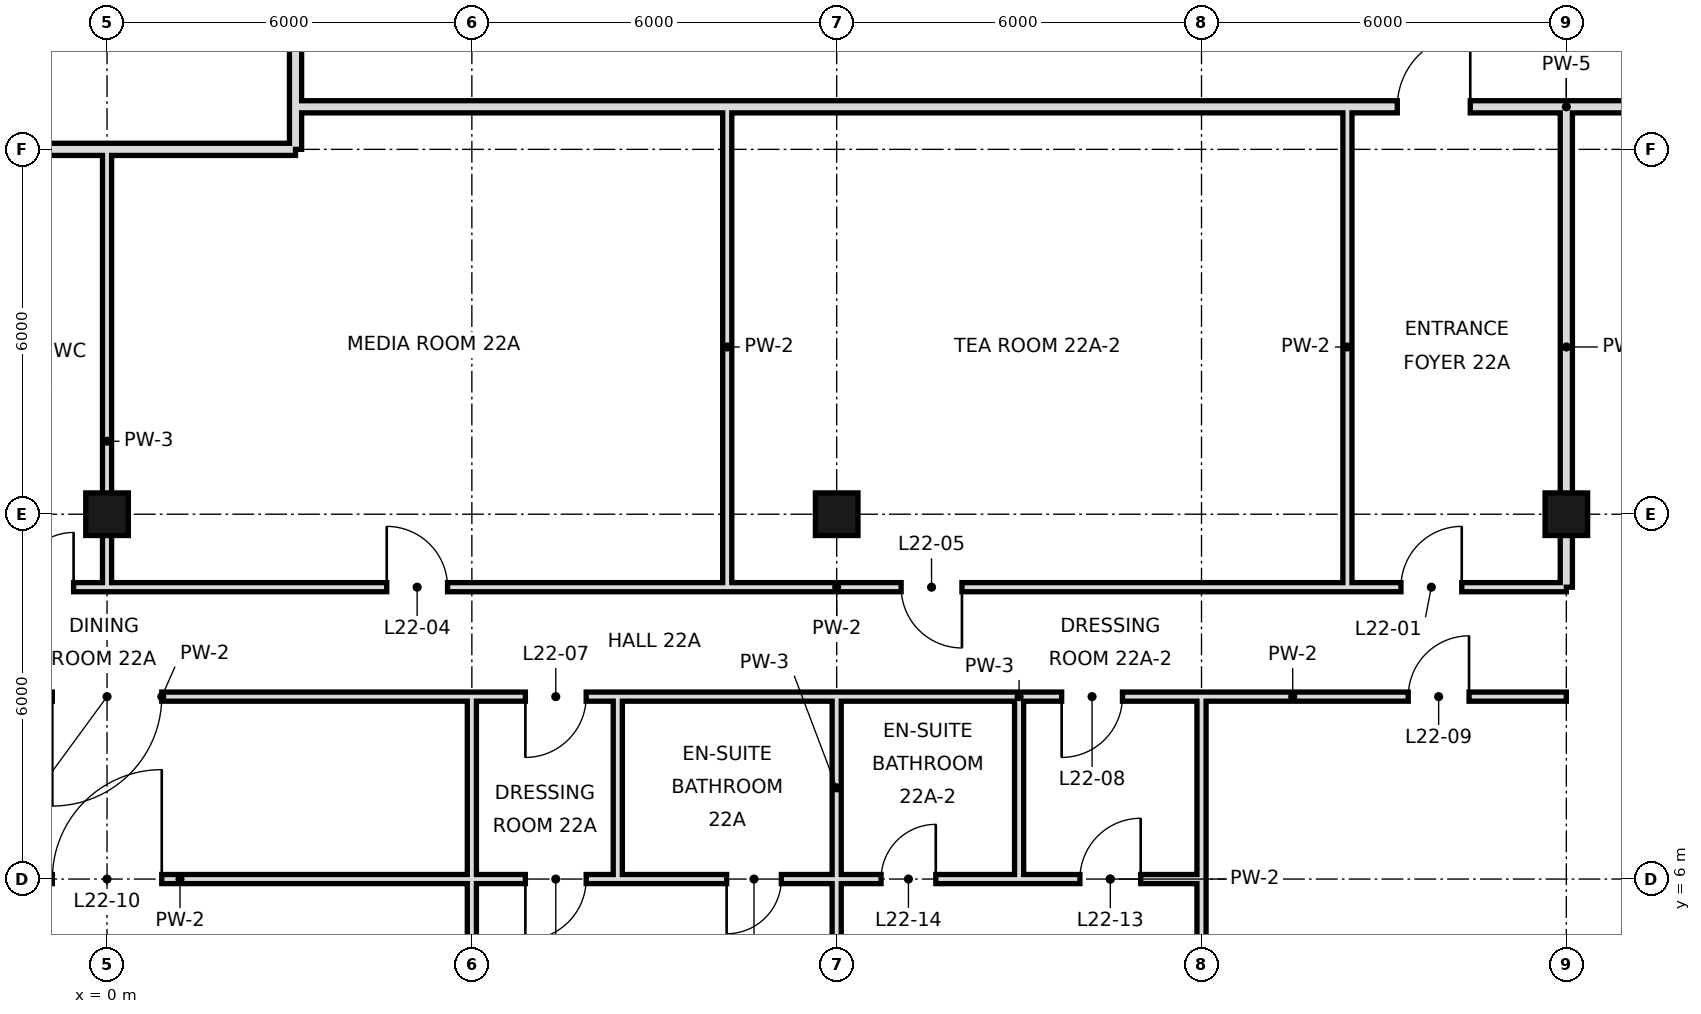
"""IFC4 building model, lengths in metres.
Left out: names, types, materials, properties, quantities, classifications, styles, units other than length and angle.
Written with IfcOpenShell. Run it as: python <this file> out.ifc"""

import sys

from ifc_helpers import new_model, si_unit, direction, frame, frame_2d, origin, origin_2d, place, context, subcontext, project, spatial, rectangle, hollow_rectangle, extrude, element, fill, save


model = new_model("IFC4")
c1 = context("Model", 3, precision=1e-05, world=origin(), true_north=direction((0.0, 1.0)))
c2 = subcontext(c1, "Body", "Model", "MODEL_VIEW")
j1 = project(units=[si_unit("LENGTHUNIT", "METRE"), si_unit("PLANEANGLEUNIT", "RADIAN")], contexts=[c1])
p1 = place(None, origin())
s1 = spatial("IfcSite", under=j1, at=p1, CompositionType="ELEMENT")
p2 = place(p1, origin())
s2 = spatial("IfcBuilding", under=s1, at=p2, CompositionType="ELEMENT")
p3 = place(p2, frame((0.0, 0.0, 103.4)))
s3 = spatial("IfcBuildingStorey", under=s2, at=p3, CompositionType="ELEMENT", Elevation=103.4)
for number, where, z_axis, x_axis in (
    (1, (0.0, 12.0, 0.0), (0.0, 0.0, 1.0), (1.0, 0.0, 0.0)),
    (2, (12.0, 12.0, 0.0), (0.0, 0.0, 1.0), (1.0, 0.0, 0.0)),
    (3, (24.0, 12.0, 0.0), (0.0, 0.0, 1.0), (1.0, 0.0, 0.0)),
):
    element("IfcColumn", number, at=place(p3, frame(where, z_axis=z_axis, x_axis=x_axis)), inside=s3, PredefinedType="COLUMN", context=c2, shape_type="SweptSolid", body=[
        extrude(hollow_rectangle(XDim=0.7, YDim=0.7, WallThickness=0.036, at=origin_2d()), origin(), (0.0, 0.0, 1.0), 3.6),
    ])
p4 = place(p3, frame((0.0, 10.8, 0.0), z_axis=(0.0, 0.0, 1.0), x_axis=(0.0, 1.0, 0.0)))
e4 = element("IfcWall", 4, at=p4, inside=s3, PredefinedType="PARTITIONING", context=c2, shape_type="SweptSolid", body=[
    extrude(rectangle(XDim=7.2, YDim=0.15, at=frame_2d((3.6, 0.0))), origin(), (0.0, 0.0, 1.0), 2.72),
])
p5 = place(p3, frame((10.2, 10.8, 0.0), z_axis=(0.0, 0.0, 1.0), x_axis=(0.0, 1.0, 0.0)))
e5 = element("IfcWall", 5, at=p5, inside=s3, PredefinedType="PARTITIONING", context=c2, shape_type="SweptSolid", body=[
    extrude(rectangle(XDim=7.9, YDim=0.15, at=frame_2d((3.95, 0.0))), origin(), (0.0, 0.0, 1.0), 3.42),
])
p6 = place(p3, frame((12.0, 0.0, 0.0), z_axis=(0.0, 0.0, 1.0), x_axis=(0.0, 1.0, 0.0)))
e6 = element("IfcWall", 6, at=p6, inside=s3, PredefinedType="PARTITIONING", context=c2, shape_type="SweptSolid", body=[
    extrude(rectangle(XDim=6.0, YDim=0.15, at=frame_2d((3.0, 0.0))), origin(), (0.0, 0.0, 1.0), 2.72),
])
p7 = place(p3, frame((12.0, 6.0, 0.0), z_axis=(0.0, 0.0, 1.0), x_axis=(0.0, 1.0, 0.0)))
e7 = element("IfcWall", 7, at=p7, inside=s3, PredefinedType="PARTITIONING", context=c2, shape_type="SweptSolid", body=[
    extrude(rectangle(XDim=3.0, YDim=0.15, at=frame_2d((1.5, 0.0))), origin(), (0.0, 0.0, 1.0), 2.72),
])
p8 = place(p3, frame((15.0, 6.0, 0.0), z_axis=(0.0, 0.0, 1.0), x_axis=(0.0, 1.0, 0.0)))
e8 = element("IfcWall", 8, at=p8, inside=s3, PredefinedType="PARTITIONING", context=c2, shape_type="SweptSolid", body=[
    extrude(rectangle(XDim=3.0, YDim=0.15, at=frame_2d((1.5, 0.0))), origin(), (0.0, 0.0, 1.0), 3.42),
])
p9 = place(p3, frame((18.0, -0.6, 0.0), z_axis=(0.0, 0.0, 1.0), x_axis=(0.0, 1.0, 0.0)))
e9 = element("IfcWall", 9, at=p9, inside=s3, PredefinedType="PARTITIONING", context=c2, shape_type="SweptSolid", body=[
    extrude(rectangle(XDim=9.6, YDim=0.15, at=frame_2d((4.8, 0.0))), origin(), (0.0, 0.0, 1.0), 2.72),
])
p10 = place(p3, frame((20.4, 10.8, 0.0), z_axis=(0.0, 0.0, 1.0), x_axis=(0.0, 1.0, 0.0)))
e10 = element("IfcWall", 10, at=p10, inside=s3, PredefinedType="PARTITIONING", context=c2, shape_type="SweptSolid", body=[
    extrude(rectangle(XDim=7.9, YDim=0.15, at=frame_2d((3.95, 0.0))), origin(), (0.0, 0.0, 1.0), 3.42),
])
p11 = place(p3, frame((24.0, 10.8, 0.0), z_axis=(0.0, 0.0, 1.0), x_axis=(0.0, 1.0, 0.0)))
e11 = element("IfcWall", 11, at=p11, inside=s3, PredefinedType="SOLIDWALL", context=c2, shape_type="SweptSolid", body=[
    extrude(rectangle(XDim=7.9, YDim=0.2, at=frame_2d((3.95, 0.0))), origin(), (0.0, 0.0, 1.0), 2.72),
])
p12 = place(p3, frame((3.1, 18.0, 0.0), z_axis=(0.0, 0.0, 1.0), x_axis=(0.0, 1.0, 0.0)))
e12 = element("IfcWall", 12, at=p12, inside=s3, PredefinedType="SOLIDWALL", context=c2, shape_type="SweptSolid", body=[
    extrude(rectangle(XDim=30.6, YDim=0.2, at=frame_2d((15.3, 0.0))), origin(), (0.0, 0.0, 1.0), 2.72),
])
p13 = place(p12, frame((9.23, 0.0, 0.0)))
e13 = element("IfcOpeningElement", 13, at=p13, cuts=e12, PredefinedType="OPENING", context=c2, shape_type="SweptSolid", body=[
    extrude(rectangle(XDim=1.2, YDim=2.4, at=frame_2d((0.6, 1.2))), frame((0.0, 0.11, 0.0), z_axis=(0.0, -1.0, 0.0), x_axis=(1.0, 0.0, 0.0)), (0.0, 0.0, 1.0), 0.22),
])
p14 = place(p3, frame((6.0, -0.6, 0.0), z_axis=(0.0, 0.0, 1.0), x_axis=(0.0, 1.0, 0.0)))
e14 = element("IfcWall", 14, at=p14, inside=s3, PredefinedType="PARTITIONING", context=c2, shape_type="SweptSolid", body=[
    extrude(rectangle(XDim=9.6, YDim=0.15, at=frame_2d((4.8, 0.0))), origin(), (0.0, 0.0, 1.0), 2.72),
])
p15 = place(p3, frame((8.4, 6.0, 0.0), z_axis=(0.0, 0.0, 1.0), x_axis=(0.0, 1.0, 0.0)))
e15 = element("IfcWall", 15, at=p15, inside=s3, PredefinedType="PARTITIONING", context=c2, shape_type="SweptSolid", body=[
    extrude(rectangle(XDim=3.0, YDim=0.15, at=frame_2d((1.5, 0.0))), origin(), (0.0, 0.0, 1.0), 3.42),
])
p16 = place(p3, frame((0.0, 10.8, 0.0), z_axis=(0.0, 0.0, 1.0), x_axis=(1.0, 0.0, 0.0)))
e16 = element("IfcWall", 16, at=p16, inside=s3, PredefinedType="PARTITIONING", context=c2, shape_type="SweptSolid", body=[
    extrude(rectangle(XDim=24.0, YDim=0.15, at=frame_2d((12.0, 0.0))), origin(), (0.0, 0.0, 1.0), 3.42),
])
p17 = place(p16, frame((21.28, 0.0, 0.0)))
e17 = element("IfcOpeningElement", 17, at=p17, cuts=e16, PredefinedType="OPENING", context=c2, shape_type="SweptSolid", body=[
    extrude(rectangle(XDim=1.0, YDim=2.4, at=frame_2d((0.5, 1.2))), frame((0.0, 0.085, 0.0), z_axis=(0.0, -1.0, 0.0), x_axis=(1.0, 0.0, 0.0)), (0.0, 0.0, 1.0), 0.17),
])
p18 = place(p16, frame((4.6, 0.0, 0.0)))
e18 = element("IfcOpeningElement", 18, at=p18, cuts=e16, PredefinedType="OPENING", context=c2, shape_type="SweptSolid", body=[
    extrude(rectangle(XDim=1.0, YDim=2.4, at=frame_2d((0.5, 1.2))), frame((0.0, 0.085, 0.0), z_axis=(0.0, -1.0, 0.0), x_axis=(1.0, 0.0, 0.0)), (0.0, 0.0, 1.0), 0.17),
])
p19 = place(p16, frame((13.06, 0.0, 0.0)))
e19 = element("IfcOpeningElement", 19, at=p19, cuts=e16, PredefinedType="OPENING", context=c2, shape_type="SweptSolid", body=[
    extrude(rectangle(XDim=1.0, YDim=2.4, at=frame_2d((0.5, 1.2))), frame((0.0, 0.085, 0.0), z_axis=(0.0, -1.0, 0.0), x_axis=(1.0, 0.0, 0.0)), (0.0, 0.0, 1.0), 0.17),
])
p20 = place(p3, frame((-2.4, 10.8, 0.0), z_axis=(0.0, 0.0, 1.0), x_axis=(1.0, 0.0, 0.0)))
e20 = element("IfcWall", 20, at=p20, inside=s3, PredefinedType="PARTITIONING", context=c2, shape_type="SweptSolid", body=[
    extrude(rectangle(XDim=2.4, YDim=0.15, at=frame_2d((1.2, 0.0))), origin(), (0.0, 0.0, 1.0), 3.42),
])
p21 = place(p20, frame((0.95, 0.0, 0.0)))
e21 = element("IfcOpeningElement", 21, at=p21, cuts=e20, PredefinedType="OPENING", context=c2, shape_type="SweptSolid", body=[
    extrude(rectangle(XDim=0.9, YDim=2.4, at=frame_2d((0.45, 1.2))), frame((0.0, 0.085, 0.0), z_axis=(0.0, -1.0, 0.0), x_axis=(1.0, 0.0, 0.0)), (0.0, 0.0, 1.0), 0.17),
])
p22 = place(p3, frame((-2.4, 18.0, 0.0), z_axis=(0.0, 0.0, 1.0), x_axis=(1.0, 0.0, 0.0)))
e22 = element("IfcWall", 22, at=p22, inside=s3, PredefinedType="SOLIDWALL", context=c2, shape_type="SweptSolid", body=[
    extrude(rectangle(XDim=5.5, YDim=0.2, at=frame_2d((2.75, 0.0))), origin(), (0.0, 0.0, 1.0), 2.72),
])
p23 = place(p3, frame((3.1, 18.7, 0.0), z_axis=(0.0, 0.0, 1.0), x_axis=(1.0, 0.0, 0.0)))
e23 = element("IfcWall", 23, at=p23, inside=s3, PredefinedType="SOLIDWALL", context=c2, shape_type="SweptSolid", body=[
    extrude(rectangle(XDim=41.8, YDim=0.2, at=frame_2d((20.9, 0.0))), origin(), (0.0, 0.0, 1.0), 2.72),
])
p24 = place(p23, frame((18.12, 0.0, 0.0)))
e24 = element("IfcOpeningElement", 24, at=p24, cuts=e23, PredefinedType="OPENING", context=c2, shape_type="SweptSolid", body=[
    extrude(rectangle(XDim=1.2, YDim=2.4, at=frame_2d((0.6, 1.2))), frame((0.0, 0.11, 0.0), z_axis=(0.0, -1.0, 0.0), x_axis=(1.0, 0.0, 0.0)), (0.0, 0.0, 1.0), 0.22),
])
p25 = place(p23, frame((26.73, 0.0, 0.0)))
e25 = element("IfcOpeningElement", 25, at=p25, cuts=e23, PredefinedType="OPENING", context=c2, shape_type="SweptSolid", body=[
    extrude(rectangle(XDim=1.8, YDim=2.4, at=frame_2d((0.9, 1.2))), frame((0.0, 0.11, 0.0), z_axis=(0.0, -1.0, 0.0), x_axis=(1.0, 0.0, 0.0)), (0.0, 0.0, 1.0), 0.22),
])
p26 = place(p3, frame((-6.0, 6.0, 0.0), z_axis=(0.0, 0.0, 1.0), x_axis=(1.0, 0.0, 0.0)))
e26 = element("IfcWall", 26, at=p26, inside=s3, PredefinedType="PARTITIONING", context=c2, shape_type="SweptSolid", body=[
    extrude(rectangle(XDim=14.4, YDim=0.15, at=frame_2d((7.2, 0.0))), origin(), (0.0, 0.0, 1.0), 2.97),
])
p27 = place(p26, frame((5.1, 0.0, 0.0)))
e27 = element("IfcOpeningElement", 27, at=p27, cuts=e26, PredefinedType="OPENING", context=c2, shape_type="SweptSolid", body=[
    extrude(rectangle(XDim=1.8, YDim=2.4, at=frame_2d((0.9, 1.2))), frame((0.0, 0.085, 0.0), z_axis=(0.0, -1.0, 0.0), x_axis=(1.0, 0.0, 0.0)), (0.0, 0.0, 1.0), 0.17),
])
p28 = place(p26, frame((12.88, 0.0, 0.0)))
e28 = element("IfcOpeningElement", 28, at=p28, cuts=e26, PredefinedType="OPENING", context=c2, shape_type="SweptSolid", body=[
    extrude(rectangle(XDim=1.0, YDim=2.4, at=frame_2d((0.5, 1.2))), frame((0.0, 0.085, 0.0), z_axis=(0.0, -1.0, 0.0), x_axis=(1.0, 0.0, 0.0)), (0.0, 0.0, 1.0), 0.17),
])
p29 = place(p3, frame((15.0, 6.0, 0.0), z_axis=(0.0, 0.0, 1.0), x_axis=(1.0, 0.0, 0.0)))
e29 = element("IfcWall", 29, at=p29, inside=s3, PredefinedType="PARTITIONING", context=c2, shape_type="SweptSolid", body=[
    extrude(rectangle(XDim=3.0, YDim=0.15, at=frame_2d((1.5, 0.0))), origin(), (0.0, 0.0, 1.0), 2.97),
])
p30 = place(p29, frame((1.0, 0.0, 0.0)))
e30 = element("IfcOpeningElement", 30, at=p30, cuts=e29, PredefinedType="OPENING", context=c2, shape_type="SweptSolid", body=[
    extrude(rectangle(XDim=1.0, YDim=2.4, at=frame_2d((0.5, 1.2))), frame((0.0, 0.085, 0.0), z_axis=(0.0, -1.0, 0.0), x_axis=(1.0, 0.0, 0.0)), (0.0, 0.0, 1.0), 0.17),
])
p31 = place(p3, frame((8.4, 6.0, 0.0), z_axis=(0.0, 0.0, 1.0), x_axis=(1.0, 0.0, 0.0)))
e31 = element("IfcWall", 31, at=p31, inside=s3, PredefinedType="PARTITIONING", context=c2, shape_type="SweptSolid", body=[
    extrude(rectangle(XDim=6.6, YDim=0.15, at=frame_2d((3.3, 0.0))), origin(), (0.0, 0.0, 1.0), 2.97),
])
p32 = place(p31, frame((1.79, 0.0, 0.0)))
e32 = element("IfcOpeningElement", 32, at=p32, cuts=e31, PredefinedType="OPENING", context=c2, shape_type="SweptSolid", body=[
    extrude(rectangle(XDim=0.9, YDim=2.4, at=frame_2d((0.45, 1.2))), frame((0.0, 0.085, 0.0), z_axis=(0.0, -1.0, 0.0), x_axis=(1.0, 0.0, 0.0)), (0.0, 0.0, 1.0), 0.17),
])
p33 = place(p31, frame((4.33, 0.0, 0.0)))
e33 = element("IfcOpeningElement", 33, at=p33, cuts=e31, PredefinedType="OPENING", context=c2, shape_type="SweptSolid", body=[
    extrude(rectangle(XDim=0.9, YDim=2.4, at=frame_2d((0.45, 1.2))), frame((0.0, 0.085, 0.0), z_axis=(0.0, -1.0, 0.0), x_axis=(1.0, 0.0, 0.0)), (0.0, 0.0, 1.0), 0.17),
])
p34 = place(p3, frame((-6.6, 9.0, 0.0), z_axis=(0.0, 0.0, 1.0), x_axis=(1.0, 0.0, 0.0)))
e34 = element("IfcWall", 34, at=p34, inside=s3, PredefinedType="PARTITIONING", context=c2, shape_type="SweptSolid", body=[
    extrude(rectangle(XDim=15.0, YDim=0.15, at=frame_2d((7.5, 0.0))), origin(), (0.0, 0.0, 1.0), 3.42),
])
p35 = place(p34, frame((5.7, 0.0, 0.0)))
e35 = element("IfcOpeningElement", 35, at=p35, cuts=e34, PredefinedType="OPENING", context=c2, shape_type="SweptSolid", body=[
    extrude(rectangle(XDim=1.8, YDim=2.4, at=frame_2d((0.9, 1.2))), frame((0.0, 0.085, 0.0), z_axis=(0.0, -1.0, 0.0), x_axis=(1.0, 0.0, 0.0)), (0.0, 0.0, 1.0), 0.17),
])
p36 = place(p34, frame((13.48, 0.0, 0.0)))
e36 = element("IfcOpeningElement", 36, at=p36, cuts=e34, PredefinedType="OPENING", context=c2, shape_type="SweptSolid", body=[
    extrude(rectangle(XDim=1.0, YDim=2.4, at=frame_2d((0.5, 1.2))), frame((0.0, 0.085, 0.0), z_axis=(0.0, -1.0, 0.0), x_axis=(1.0, 0.0, 0.0)), (0.0, 0.0, 1.0), 0.17),
])
p37 = place(p3, frame((15.0, 9.0, 0.0), z_axis=(0.0, 0.0, 1.0), x_axis=(1.0, 0.0, 0.0)))
e37 = element("IfcWall", 37, at=p37, inside=s3, PredefinedType="PARTITIONING", context=c2, shape_type="SweptSolid", body=[
    extrude(rectangle(XDim=9.0, YDim=0.15, at=frame_2d((4.5, 0.0))), origin(), (0.0, 0.0, 1.0), 3.42),
])
p38 = place(p37, frame((0.7, 0.0, 0.0)))
e38 = element("IfcOpeningElement", 38, at=p38, cuts=e37, PredefinedType="OPENING", context=c2, shape_type="SweptSolid", body=[
    extrude(rectangle(XDim=1.0, YDim=2.4, at=frame_2d((0.5, 1.2))), frame((0.0, 0.085, 0.0), z_axis=(0.0, -1.0, 0.0), x_axis=(1.0, 0.0, 0.0)), (0.0, 0.0, 1.0), 0.17),
])
p39 = place(p37, frame((6.4, 0.0, 0.0)))
e39 = element("IfcOpeningElement", 39, at=p39, cuts=e37, PredefinedType="OPENING", context=c2, shape_type="SweptSolid", body=[
    extrude(rectangle(XDim=1.0, YDim=2.4, at=frame_2d((0.5, 1.2))), frame((0.0, 0.085, 0.0), z_axis=(0.0, -1.0, 0.0), x_axis=(1.0, 0.0, 0.0)), (0.0, 0.0, 1.0), 0.17),
])
p40 = place(p3, frame((8.4, 9.0, 0.0), z_axis=(0.0, 0.0, 1.0), x_axis=(1.0, 0.0, 0.0)))
e40 = element("IfcWall", 40, at=p40, inside=s3, PredefinedType="PARTITIONING", context=c2, shape_type="SweptSolid", body=[
    extrude(rectangle(XDim=6.6, YDim=0.15, at=frame_2d((3.3, 0.0))), origin(), (0.0, 0.0, 1.0), 3.42),
])
p41 = place(p17, frame((1.0, 0.0, 0.0), z_axis=(0.0, 0.0, 1.0), x_axis=(-1.0, 0.0, 0.0)))
e41 = element("IfcDoor", 41, at=p41, inside=s3, OperationType="SINGLE_SWING_LEFT", PredefinedType="DOOR", context=c2, shape_type="SweptSolid", body=[
    extrude(rectangle(XDim=1.0, YDim=2.4, at=frame_2d((0.5, 1.2))), frame((0.0, 0.025, 0.0), z_axis=(0.0, -1.0, 0.0), x_axis=(1.0, 0.0, 0.0)), (0.0, 0.0, 1.0), 0.05),
])
fill(e17, e41)
p42 = place(p21, frame((0.9, 0.0, 0.0), z_axis=(0.0, 0.0, 1.0), x_axis=(-1.0, 0.0, 0.0)))
e42 = element("IfcDoor", 42, at=p42, inside=s3, OperationType="SINGLE_SWING_LEFT", PredefinedType="DOOR", context=c2, shape_type="SweptSolid", body=[
    extrude(rectangle(XDim=0.9, YDim=2.4, at=frame_2d((0.45, 1.2))), frame((0.0, 0.025, 0.0), z_axis=(0.0, -1.0, 0.0), x_axis=(1.0, 0.0, 0.0)), (0.0, 0.0, 1.0), 0.05),
])
fill(e21, e42)
p43 = place(p18, origin())
e43 = element("IfcDoor", 43, at=p43, inside=s3, OperationType="SINGLE_SWING_LEFT", PredefinedType="DOOR", context=c2, shape_type="SweptSolid", body=[
    extrude(rectangle(XDim=1.0, YDim=2.4, at=frame_2d((0.5, 1.2))), frame((0.0, 0.025, 0.0), z_axis=(0.0, -1.0, 0.0), x_axis=(1.0, 0.0, 0.0)), (0.0, 0.0, 1.0), 0.05),
])
fill(e18, e43)
p44 = place(p19, origin())
e44 = element("IfcDoor", 44, at=p44, inside=s3, OperationType="SINGLE_SWING_RIGHT", PredefinedType="DOOR", context=c2, shape_type="SweptSolid", body=[
    extrude(rectangle(XDim=1.0, YDim=2.4, at=frame_2d((0.5, 1.2))), frame((0.0, 0.025, 0.0), z_axis=(0.0, -1.0, 0.0), x_axis=(1.0, 0.0, 0.0)), (0.0, 0.0, 1.0), 0.05),
])
fill(e19, e44)
p45 = place(p35, frame((1.8, 0.0, 0.0), z_axis=(0.0, 0.0, 1.0), x_axis=(-1.0, 0.0, 0.0)))
e45 = element("IfcDoor", 45, at=p45, inside=s3, OperationType="SINGLE_SWING_RIGHT", PredefinedType="DOOR", context=c2, shape_type="SweptSolid", body=[
    extrude(rectangle(XDim=1.8, YDim=2.4, at=frame_2d((0.9, 1.2))), frame((0.0, 0.025, 0.0), z_axis=(0.0, -1.0, 0.0), x_axis=(1.0, 0.0, 0.0)), (0.0, 0.0, 1.0), 0.05),
])
fill(e35, e45)
p46 = place(p36, frame((1.0, 0.0, 0.0), z_axis=(0.0, 0.0, 1.0), x_axis=(-1.0, 0.0, 0.0)))
e46 = element("IfcDoor", 46, at=p46, inside=s3, OperationType="SINGLE_SWING_RIGHT", PredefinedType="DOOR", context=c2, shape_type="SweptSolid", body=[
    extrude(rectangle(XDim=1.0, YDim=2.4, at=frame_2d((0.5, 1.2))), frame((0.0, 0.025, 0.0), z_axis=(0.0, -1.0, 0.0), x_axis=(1.0, 0.0, 0.0)), (0.0, 0.0, 1.0), 0.05),
])
fill(e36, e46)
p47 = place(p38, frame((1.0, 0.0, 0.0), z_axis=(0.0, 0.0, 1.0), x_axis=(-1.0, 0.0, 0.0)))
e47 = element("IfcDoor", 47, at=p47, inside=s3, OperationType="SINGLE_SWING_RIGHT", PredefinedType="DOOR", context=c2, shape_type="SweptSolid", body=[
    extrude(rectangle(XDim=1.0, YDim=2.4, at=frame_2d((0.5, 1.2))), frame((0.0, 0.025, 0.0), z_axis=(0.0, -1.0, 0.0), x_axis=(1.0, 0.0, 0.0)), (0.0, 0.0, 1.0), 0.05),
])
fill(e38, e47)
p48 = place(p39, frame((1.0, 0.0, 0.0), z_axis=(0.0, 0.0, 1.0), x_axis=(-1.0, 0.0, 0.0)))
e48 = element("IfcDoor", 48, at=p48, inside=s3, OperationType="SINGLE_SWING_LEFT", PredefinedType="DOOR", context=c2, shape_type="SweptSolid", body=[
    extrude(rectangle(XDim=1.0, YDim=2.4, at=frame_2d((0.5, 1.2))), frame((0.0, 0.025, 0.0), z_axis=(0.0, -1.0, 0.0), x_axis=(1.0, 0.0, 0.0)), (0.0, 0.0, 1.0), 0.05),
])
fill(e39, e48)
p49 = place(p27, frame((1.8, 0.0, 0.0), z_axis=(0.0, 0.0, 1.0), x_axis=(-1.0, 0.0, 0.0)))
e49 = element("IfcDoor", 49, at=p49, inside=s3, OperationType="SINGLE_SWING_LEFT", PredefinedType="DOOR", context=c2, shape_type="SweptSolid", body=[
    extrude(rectangle(XDim=1.8, YDim=2.4, at=frame_2d((0.9, 1.2))), frame((0.0, 0.025, 0.0), z_axis=(0.0, -1.0, 0.0), x_axis=(1.0, 0.0, 0.0)), (0.0, 0.0, 1.0), 0.05),
])
fill(e27, e49)
p50 = place(p28, frame((1.0, 0.0, 0.0), z_axis=(0.0, 0.0, 1.0), x_axis=(-1.0, 0.0, 0.0)))
e50 = element("IfcDoor", 50, at=p50, inside=s3, OperationType="SINGLE_SWING_RIGHT", PredefinedType="DOOR", context=c2, shape_type="SweptSolid", body=[
    extrude(rectangle(XDim=1.0, YDim=2.4, at=frame_2d((0.5, 1.2))), frame((0.0, 0.025, 0.0), z_axis=(0.0, -1.0, 0.0), x_axis=(1.0, 0.0, 0.0)), (0.0, 0.0, 1.0), 0.05),
])
fill(e28, e50)
p51 = place(p32, frame((0.9, 0.0, 0.0), z_axis=(0.0, 0.0, 1.0), x_axis=(-1.0, 0.0, 0.0)))
e51 = element("IfcDoor", 51, at=p51, inside=s3, OperationType="SINGLE_SWING_RIGHT", PredefinedType="DOOR", context=c2, shape_type="SweptSolid", body=[
    extrude(rectangle(XDim=0.9, YDim=2.4, at=frame_2d((0.45, 1.2))), frame((0.0, 0.025, 0.0), z_axis=(0.0, -1.0, 0.0), x_axis=(1.0, 0.0, 0.0)), (0.0, 0.0, 1.0), 0.05),
])
fill(e32, e51)
p52 = place(p30, frame((1.0, 0.0, 0.0), z_axis=(0.0, 0.0, 1.0), x_axis=(-1.0, 0.0, 0.0)))
e52 = element("IfcDoor", 52, at=p52, inside=s3, OperationType="SINGLE_SWING_LEFT", PredefinedType="DOOR", context=c2, shape_type="SweptSolid", body=[
    extrude(rectangle(XDim=1.0, YDim=2.4, at=frame_2d((0.5, 1.2))), frame((0.0, 0.025, 0.0), z_axis=(0.0, -1.0, 0.0), x_axis=(1.0, 0.0, 0.0)), (0.0, 0.0, 1.0), 0.05),
])
fill(e30, e52)
p53 = place(p33, frame((0.9, 0.0, 0.0), z_axis=(0.0, 0.0, 1.0), x_axis=(-1.0, 0.0, 0.0)))
e53 = element("IfcDoor", 53, at=p53, inside=s3, OperationType="SINGLE_SWING_LEFT", PredefinedType="DOOR", context=c2, shape_type="SweptSolid", body=[
    extrude(rectangle(XDim=0.9, YDim=2.4, at=frame_2d((0.45, 1.2))), frame((0.0, 0.025, 0.0), z_axis=(0.0, -1.0, 0.0), x_axis=(1.0, 0.0, 0.0)), (0.0, 0.0, 1.0), 0.05),
])
fill(e33, e53)
p54 = place(p24, frame((1.2, 0.0, 0.0), z_axis=(0.0, 0.0, 1.0), x_axis=(-1.0, 0.0, 0.0)))
e54 = element("IfcDoor", 54, at=p54, inside=s3, OperationType="SINGLE_SWING_LEFT", PredefinedType="DOOR", context=c2, shape_type="SweptSolid", body=[
    extrude(rectangle(XDim=1.2, YDim=2.4, at=frame_2d((0.6, 1.2))), frame((0.0, 0.025, 0.0), z_axis=(0.0, -1.0, 0.0), x_axis=(1.0, 0.0, 0.0)), (0.0, 0.0, 1.0), 0.05),
])
fill(e24, e54)
save(model, sys.argv[1])
